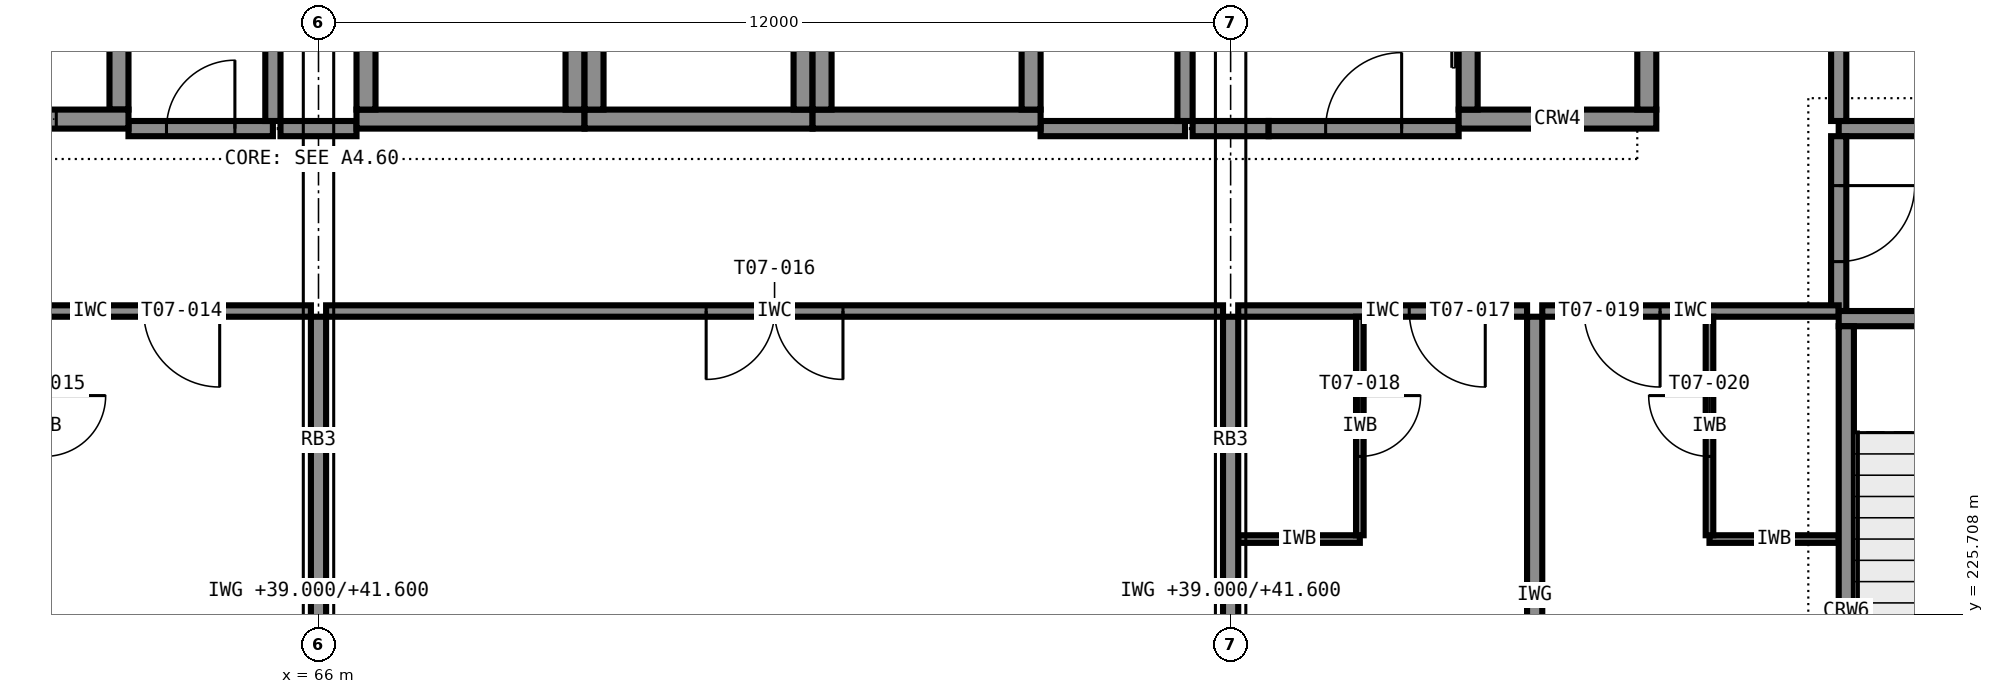
"""IFC4 building model, lengths in metres.
Left out: names, types, materials, properties, quantities, classifications, styles, units other than length and angle.
Written with IfcOpenShell. Run it as: python <this file> out.ifc"""

import sys

from ifc_helpers import new_model, si_unit, direction, frame, frame_2d, origin, place, context, subcontext, project, spatial, rectangle, extrude, element, fill, save


model = new_model("IFC4")
c1 = context("Model", 3, precision=1e-05, world=origin(), true_north=direction((0.0, 1.0)))
c2 = subcontext(c1, "Body", "Model", "MODEL_VIEW")
j1 = project(units=[si_unit("LENGTHUNIT", "METRE"), si_unit("PLANEANGLEUNIT", "RADIAN")], contexts=[c1])
p1 = place(None, origin())
s1 = spatial("IfcSite", under=j1, at=p1, CompositionType="ELEMENT")
p2 = place(p1, origin())
s2 = spatial("IfcBuilding", under=s1, at=p2, CompositionType="ELEMENT")
p3 = place(p2, frame((0.0, 0.0, 39.0)))
s3 = spatial("IfcBuildingStorey", under=s2, at=p3, CompositionType="ELEMENT", Elevation=39.0)
p4 = place(p3, frame((60.5, 232.225, 0.0), z_axis=(0.0, 0.0, 1.0), x_axis=(1.0, 0.0, 0.0)))
e1 = element("IfcWall", 1, at=p4, inside=s3, PredefinedType="SHEAR", context=c2, shape_type="SweptSolid", body=[
    extrude(rectangle(XDim=3.0, YDim=0.25, at=frame_2d((1.5, 0.0))), origin(), (0.0, 0.0, 1.0), 3.6),
])
p5 = place(p4, frame((0.95, 0.0, 0.0)))
e2 = element("IfcOpeningElement", 2, at=p5, cuts=e1, PredefinedType="OPENING", context=c2, shape_type="SweptSolid", body=[
    extrude(rectangle(XDim=1.1, YDim=2.1, at=frame_2d((0.55, 1.05))), frame((0.0, 0.135, 0.0), z_axis=(0.0, -1.0, 0.0), x_axis=(1.0, 0.0, 0.0)), (0.0, 0.0, 1.0), 0.27),
])
p6 = place(p3, frame((63.375, 232.35, 0.0), z_axis=(0.0, 0.0, 1.0), x_axis=(0.0, 1.0, 0.0)))
e3 = element("IfcWall", 3, at=p6, inside=s3, PredefinedType="SHEAR", context=c2, shape_type="SweptSolid", body=[
    extrude(rectangle(XDim=3.3, YDim=0.25, at=frame_2d((1.65, 0.0))), origin(), (0.0, 0.0, 1.0), 3.6),
])
p7 = place(p3, frame((66.5, 232.225, 0.0), z_axis=(0.0, 0.0, 1.0), x_axis=(1.0, 0.0, 0.0)))
e4 = element("IfcWall", 4, at=p7, inside=s3, PredefinedType="SHEAR", context=c2, shape_type="SweptSolid", body=[
    extrude(rectangle(XDim=3.0, YDim=0.25, at=frame_2d((1.5, 0.0))), origin(), (0.0, 0.0, 1.0), 3.6),
])
for number, where, z_axis, x_axis in (
    (5, (66.625, 232.35, 0.0), (0.0, 0.0, 1.0), (0.0, 1.0, 0.0)),
    (6, (69.375, 232.35, 0.0), (0.0, 0.0, 1.0), (0.0, 1.0, 0.0)),
):
    element("IfcWall", number, at=place(p3, frame(where, z_axis=z_axis, x_axis=x_axis)), inside=s3, PredefinedType="SHEAR", context=c2, shape_type="SweptSolid", body=[
        extrude(rectangle(XDim=3.3, YDim=0.25, at=frame_2d((1.65, 0.0))), origin(), (0.0, 0.0, 1.0), 3.6),
    ])
p8 = place(p3, frame((69.5, 232.225, 0.0), z_axis=(0.0, 0.0, 1.0), x_axis=(1.0, 0.0, 0.0)))
e7 = element("IfcWall", 7, at=p8, inside=s3, PredefinedType="SHEAR", context=c2, shape_type="SweptSolid", body=[
    extrude(rectangle(XDim=3.0, YDim=0.25, at=frame_2d((1.5, 0.0))), origin(), (0.0, 0.0, 1.0), 3.6),
])
for number, where, z_axis, x_axis in (
    (8, (69.625, 232.35, 0.0), (0.0, 0.0, 1.0), (0.0, 1.0, 0.0)),
    (9, (72.375, 232.35, 0.0), (0.0, 0.0, 1.0), (0.0, 1.0, 0.0)),
):
    element("IfcWall", number, at=place(p3, frame(where, z_axis=z_axis, x_axis=x_axis)), inside=s3, PredefinedType="SHEAR", context=c2, shape_type="SweptSolid", body=[
        extrude(rectangle(XDim=3.3, YDim=0.25, at=frame_2d((1.65, 0.0))), origin(), (0.0, 0.0, 1.0), 3.6),
    ])
p9 = place(p3, frame((72.5, 232.225, 0.0), z_axis=(0.0, 0.0, 1.0), x_axis=(1.0, 0.0, 0.0)))
e10 = element("IfcWall", 10, at=p9, inside=s3, PredefinedType="SHEAR", context=c2, shape_type="SweptSolid", body=[
    extrude(rectangle(XDim=3.0, YDim=0.25, at=frame_2d((1.5, 0.0))), origin(), (0.0, 0.0, 1.0), 3.6),
])
for number, where, z_axis, x_axis in (
    (11, (72.625, 232.35, 0.0), (0.0, 0.0, 1.0), (0.0, 1.0, 0.0)),
    (12, (75.375, 232.35, 0.0), (0.0, 0.0, 1.0), (0.0, 1.0, 0.0)),
):
    element("IfcWall", number, at=place(p3, frame(where, z_axis=z_axis, x_axis=x_axis)), inside=s3, PredefinedType="SHEAR", context=c2, shape_type="SweptSolid", body=[
        extrude(rectangle(XDim=3.3, YDim=0.25, at=frame_2d((1.65, 0.0))), origin(), (0.0, 0.0, 1.0), 3.6),
    ])
p10 = place(p3, frame((81.0, 232.225, 0.0), z_axis=(0.0, 0.0, 1.0), x_axis=(1.0, 0.0, 0.0)))
e13 = element("IfcWall", 13, at=p10, inside=s3, PredefinedType="SHEAR", context=c2, shape_type="SweptSolid", body=[
    extrude(rectangle(XDim=2.6, YDim=0.25, at=frame_2d((1.3, 0.0))), origin(), (0.0, 0.0, 1.0), 3.6),
])
p11 = place(p3, frame((81.125, 232.35, 0.0), z_axis=(0.0, 0.0, 1.0), x_axis=(0.0, 1.0, 0.0)))
e14 = element("IfcWall", 14, at=p11, inside=s3, PredefinedType="SHEAR", context=c2, shape_type="SweptSolid", body=[
    extrude(rectangle(XDim=3.3, YDim=0.25, at=frame_2d((1.65, 0.0))), origin(), (0.0, 0.0, 1.0), 3.6),
])
p12 = place(p11, frame((1.1, 0.0, 0.0)))
e15 = element("IfcOpeningElement", 15, at=p12, cuts=e14, PredefinedType="OPENING", context=c2, shape_type="SweptSolid", body=[
    extrude(rectangle(XDim=1.1, YDim=2.1, at=frame_2d((0.55, 1.05))), frame((0.0, 0.135, 0.0), z_axis=(0.0, -1.0, 0.0), x_axis=(1.0, 0.0, 0.0)), (0.0, 0.0, 1.0), 0.27),
])
p13 = place(p3, frame((83.475, 232.35, 0.0), z_axis=(0.0, 0.0, 1.0), x_axis=(0.0, 1.0, 0.0)))
e16 = element("IfcWall", 16, at=p13, inside=s3, PredefinedType="SHEAR", context=c2, shape_type="SweptSolid", body=[
    extrude(rectangle(XDim=3.3, YDim=0.25, at=frame_2d((1.65, 0.0))), origin(), (0.0, 0.0, 1.0), 3.6),
])
p14 = place(p3, frame((89.5, 229.6, 0.0), z_axis=(0.0, 0.0, 1.0), x_axis=(-1.0, 0.0, 0.0)))
e17 = element("IfcWall", 17, at=p14, inside=s3, PredefinedType="SHEAR", context=c2, shape_type="SweptSolid", body=[
    extrude(rectangle(XDim=3.5, YDim=0.2, at=frame_2d((1.75, 0.0))), origin(), (0.0, 0.0, 1.0), 3.6),
])
p15 = place(p14, frame((1.15, 0.0, 0.0)))
e18 = element("IfcOpeningElement", 18, at=p15, cuts=e17, PredefinedType="OPENING", context=c2, shape_type="SweptSolid", body=[
    extrude(rectangle(XDim=1.2, YDim=2.1, at=frame_2d((0.6, 1.05))), frame((0.0, 0.11, 0.0), z_axis=(0.0, -1.0, 0.0), x_axis=(1.0, 0.0, 0.0)), (0.0, 0.0, 1.0), 0.22),
])
p16 = place(p3, frame((86.1, 222.0, 0.0), z_axis=(0.0, 0.0, 1.0), x_axis=(0.0, 1.0, 0.0)))
e19 = element("IfcWall", 19, at=p16, inside=s3, PredefinedType="SHEAR", context=c2, shape_type="SweptSolid", body=[
    extrude(rectangle(XDim=7.5, YDim=0.2, at=frame_2d((3.75, 0.0))), origin(), (0.0, 0.0, 1.0), 3.6),
])
p17 = place(p3, frame((63.5, 232.1, 0.0), z_axis=(0.0, 0.0, 1.0), x_axis=(1.0, 0.0, 0.0)))
e20 = element("IfcWall", 20, at=p17, inside=s3, PredefinedType="PARTITIONING", context=c2, shape_type="SweptSolid", body=[
    extrude(rectangle(XDim=1.9, YDim=0.2, at=frame_2d((0.95, 0.0))), origin(), (0.0, 0.0, 1.0), 3.4),
])
p18 = place(p17, frame((0.5, 0.0, 0.0)))
e21 = element("IfcOpeningElement", 21, at=p18, cuts=e20, PredefinedType="OPENING", context=c2, shape_type="SweptSolid", body=[
    extrude(rectangle(XDim=0.9, YDim=2.1, at=frame_2d((0.45, 1.05))), frame((0.0, 0.11, 0.0), z_axis=(0.0, -1.0, 0.0), x_axis=(1.0, 0.0, 0.0)), (0.0, 0.0, 1.0), 0.22),
])
p19 = place(p3, frame((65.5, 232.1, 0.0), z_axis=(0.0, 0.0, 1.0), x_axis=(1.0, 0.0, 0.0)))
e22 = element("IfcWall", 22, at=p19, inside=s3, PredefinedType="PARTITIONING", context=c2, shape_type="SweptSolid", body=[
    extrude(rectangle(XDim=1.0, YDim=0.2, at=frame_2d((0.5, 0.0))), origin(), (0.0, 0.0, 1.0), 3.4),
])
p20 = place(p3, frame((75.5, 232.1, 0.0), z_axis=(0.0, 0.0, 1.0), x_axis=(1.0, 0.0, 0.0)))
e23 = element("IfcWall", 23, at=p20, inside=s3, PredefinedType="PARTITIONING", context=c2, shape_type="SweptSolid", body=[
    extrude(rectangle(XDim=1.9, YDim=0.2, at=frame_2d((0.95, 0.0))), origin(), (0.0, 0.0, 1.0), 3.4),
])
p21 = place(p3, frame((77.5, 232.1, 0.0), z_axis=(0.0, 0.0, 1.0), x_axis=(1.0, 0.0, 0.0)))
e24 = element("IfcWall", 24, at=p21, inside=s3, PredefinedType="PARTITIONING", context=c2, shape_type="SweptSolid", body=[
    extrude(rectangle(XDim=1.0, YDim=0.2, at=frame_2d((0.5, 0.0))), origin(), (0.0, 0.0, 1.0), 3.4),
])
p22 = place(p3, frame((78.5, 232.1, 0.0), z_axis=(0.0, 0.0, 1.0), x_axis=(1.0, 0.0, 0.0)))
e25 = element("IfcWall", 25, at=p22, inside=s3, PredefinedType="PARTITIONING", context=c2, shape_type="SweptSolid", body=[
    extrude(rectangle(XDim=2.5, YDim=0.2, at=frame_2d((1.25, 0.0))), origin(), (0.0, 0.0, 1.0), 3.4),
])
p23 = place(p22, frame((0.75, 0.0, 0.0)))
e26 = element("IfcOpeningElement", 26, at=p23, cuts=e25, PredefinedType="OPENING", context=c2, shape_type="SweptSolid", body=[
    extrude(rectangle(XDim=1.0, YDim=2.1, at=frame_2d((0.5, 1.05))), frame((0.0, 0.11, 0.0), z_axis=(0.0, -1.0, 0.0), x_axis=(1.0, 0.0, 0.0)), (0.0, 0.0, 1.0), 0.22),
])
p24 = place(p3, frame((86.0, 232.1, 0.0), z_axis=(0.0, 0.0, 1.0), x_axis=(1.0, 0.0, 0.0)))
e27 = element("IfcWall", 27, at=p24, inside=s3, PredefinedType="PARTITIONING", context=c2, shape_type="SweptSolid", body=[
    extrude(rectangle(XDim=3.7, YDim=0.2, at=frame_2d((1.85, 0.0))), origin(), (0.0, 0.0, 1.0), 3.4),
])
for number, where, z_axis, x_axis in (
    (28, (65.4, 232.2, 0.0), (0.0, 0.0, 1.0), (0.0, 1.0, 0.0)),
    (29, (77.4, 232.2, 0.0), (0.0, 0.0, 1.0), (0.0, 1.0, 0.0)),
):
    element("IfcWall", number, at=place(p3, frame(where, z_axis=z_axis, x_axis=x_axis)), inside=s3, PredefinedType="PARTITIONING", context=c2, shape_type="SweptSolid", body=[
        extrude(rectangle(XDim=3.6, YDim=0.2, at=frame_2d((1.8, 0.0))), origin(), (0.0, 0.0, 1.0), 3.4),
    ])
p25 = place(p3, frame((86.0, 235.8, 0.0), z_axis=(0.0, 0.0, 1.0), x_axis=(0.0, -1.0, 0.0)))
e30 = element("IfcWall", 30, at=p25, inside=s3, PredefinedType="PARTITIONING", context=c2, shape_type="SweptSolid", body=[
    extrude(rectangle(XDim=3.6, YDim=0.2, at=frame_2d((1.8, 0.0))), origin(), (0.0, 0.0, 1.0), 3.4),
])
p26 = place(p25, frame((1.35, 0.0, 0.0)))
e31 = element("IfcOpeningElement", 31, at=p26, cuts=e30, PredefinedType="OPENING", context=c2, shape_type="SweptSolid", body=[
    extrude(rectangle(XDim=0.9, YDim=2.1, at=frame_2d((0.45, 1.05))), frame((0.0, 0.11, 0.0), z_axis=(0.0, -1.0, 0.0), x_axis=(1.0, 0.0, 0.0)), (0.0, 0.0, 1.0), 0.22),
])
p27 = place(p3, frame((86.0, 232.0, 0.0), z_axis=(0.0, 0.0, 1.0), x_axis=(0.0, -1.0, 0.0)))
e32 = element("IfcWall", 32, at=p27, inside=s3, PredefinedType="PARTITIONING", context=c2, shape_type="SweptSolid", body=[
    extrude(rectangle(XDim=2.3, YDim=0.2, at=frame_2d((1.15, 0.0))), origin(), (0.0, 0.0, 1.0), 3.4),
])
p28 = place(p27, frame((0.65, 0.0, 0.0)))
e33 = element("IfcOpeningElement", 33, at=p28, cuts=e32, PredefinedType="OPENING", context=c2, shape_type="SweptSolid", body=[
    extrude(rectangle(XDim=1.0, YDim=2.1, at=frame_2d((0.5, 1.05))), frame((0.0, 0.11, 0.0), z_axis=(0.0, -1.0, 0.0), x_axis=(1.0, 0.0, 0.0)), (0.0, 0.0, 1.0), 0.22),
])
p29 = place(p3, frame((65.9, 229.7, 0.0), z_axis=(0.0, 0.0, 1.0), x_axis=(-1.0, 0.0, 0.0)))
e34 = element("IfcWall", 34, at=p29, inside=s3, PredefinedType="PARTITIONING", context=c2, shape_type="SweptSolid", body=[
    extrude(rectangle(XDim=5.8, YDim=0.15, at=frame_2d((2.9, 0.0))), origin(), (0.0, 0.0, 1.0), 3.4),
])
p30 = place(p29, frame((1.2, 0.0, 0.0)))
e35 = element("IfcOpeningElement", 35, at=p30, cuts=e34, PredefinedType="OPENING", context=c2, shape_type="SweptSolid", body=[
    extrude(rectangle(XDim=1.0, YDim=2.1, at=frame_2d((0.5, 1.05))), frame((0.0, 0.085, 0.0), z_axis=(0.0, -1.0, 0.0), x_axis=(1.0, 0.0, 0.0)), (0.0, 0.0, 1.0), 0.17),
])
p31 = place(p3, frame((77.9, 229.7, 0.0), z_axis=(0.0, 0.0, 1.0), x_axis=(-1.0, 0.0, 0.0)))
e36 = element("IfcWall", 36, at=p31, inside=s3, PredefinedType="PARTITIONING", context=c2, shape_type="SweptSolid", body=[
    extrude(rectangle(XDim=11.8, YDim=0.15, at=frame_2d((5.9, 0.0))), origin(), (0.0, 0.0, 1.0), 3.4),
])
p32 = place(p31, frame((5.0, 0.0, 0.0)))
e37 = element("IfcOpeningElement", 37, at=p32, cuts=e36, PredefinedType="OPENING", context=c2, shape_type="SweptSolid", body=[
    extrude(rectangle(XDim=1.8, YDim=2.1, at=frame_2d((0.9, 1.05))), frame((0.0, 0.085, 0.0), z_axis=(0.0, -1.0, 0.0), x_axis=(1.0, 0.0, 0.0)), (0.0, 0.0, 1.0), 0.17),
])
p33 = place(p3, frame((81.9, 229.7, 0.0), z_axis=(0.0, 0.0, 1.0), x_axis=(-1.0, 0.0, 0.0)))
e38 = element("IfcWall", 38, at=p33, inside=s3, PredefinedType="PARTITIONING", context=c2, shape_type="SweptSolid", body=[
    extrude(rectangle(XDim=3.8, YDim=0.15, at=frame_2d((1.9, 0.0))), origin(), (0.0, 0.0, 1.0), 3.4),
])
p34 = place(p33, frame((0.55, 0.0, 0.0)))
e39 = element("IfcOpeningElement", 39, at=p34, cuts=e38, PredefinedType="OPENING", context=c2, shape_type="SweptSolid", body=[
    extrude(rectangle(XDim=1.0, YDim=2.1, at=frame_2d((0.5, 1.05))), frame((0.0, 0.085, 0.0), z_axis=(0.0, -1.0, 0.0), x_axis=(1.0, 0.0, 0.0)), (0.0, 0.0, 1.0), 0.17),
])
p35 = place(p3, frame((78.1, 226.7, 0.0), z_axis=(0.0, 0.0, 1.0), x_axis=(1.0, 0.0, 0.0)))
e40 = element("IfcWall", 40, at=p35, inside=s3, PredefinedType="PARTITIONING", context=c2, shape_type="SweptSolid", body=[
    extrude(rectangle(XDim=1.6, YDim=0.1, at=frame_2d((0.8, 0.0))), origin(), (0.0, 0.0, 1.0), 3.4),
])
p36 = place(p3, frame((79.7, 229.625, 0.0), z_axis=(0.0, 0.0, 1.0), x_axis=(0.0, -1.0, 0.0)))
e41 = element("IfcWall", 41, at=p36, inside=s3, PredefinedType="PARTITIONING", context=c2, shape_type="SweptSolid", body=[
    extrude(rectangle(XDim=2.875, YDim=0.1, at=frame_2d((1.438, 0.0))), origin(), (0.0, 0.0, 1.0), 3.4),
])
p37 = place(p36, frame((1.038, 0.0, 0.0)))
e42 = element("IfcOpeningElement", 42, at=p37, cuts=e41, PredefinedType="OPENING", context=c2, shape_type="SweptSolid", body=[
    extrude(rectangle(XDim=0.8, YDim=2.1, at=frame_2d((0.4, 1.05))), frame((0.0, 0.06, 0.0), z_axis=(0.0, -1.0, 0.0), x_axis=(1.0, 0.0, 0.0)), (0.0, 0.0, 1.0), 0.12),
])
p38 = place(p3, frame((86.0, 229.7, 0.0), z_axis=(0.0, 0.0, 1.0), x_axis=(-1.0, 0.0, 0.0)))
e43 = element("IfcWall", 43, at=p38, inside=s3, PredefinedType="PARTITIONING", context=c2, shape_type="SweptSolid", body=[
    extrude(rectangle(XDim=3.9, YDim=0.15, at=frame_2d((1.95, 0.0))), origin(), (0.0, 0.0, 1.0), 3.4),
])
p39 = place(p38, frame((2.35, 0.0, 0.0)))
e44 = element("IfcOpeningElement", 44, at=p39, cuts=e43, PredefinedType="OPENING", context=c2, shape_type="SweptSolid", body=[
    extrude(rectangle(XDim=1.0, YDim=2.1, at=frame_2d((0.5, 1.05))), frame((0.0, 0.085, 0.0), z_axis=(0.0, -1.0, 0.0), x_axis=(1.0, 0.0, 0.0)), (0.0, 0.0, 1.0), 0.17),
])
p40 = place(p3, frame((84.3, 226.7, 0.0), z_axis=(0.0, 0.0, 1.0), x_axis=(1.0, 0.0, 0.0)))
e45 = element("IfcWall", 45, at=p40, inside=s3, PredefinedType="PARTITIONING", context=c2, shape_type="SweptSolid", body=[
    extrude(rectangle(XDim=1.7, YDim=0.1, at=frame_2d((0.85, 0.0))), origin(), (0.0, 0.0, 1.0), 3.4),
])
p41 = place(p3, frame((84.3, 226.75, 0.0), z_axis=(0.0, 0.0, 1.0), x_axis=(0.0, 1.0, 0.0)))
e46 = element("IfcWall", 46, at=p41, inside=s3, PredefinedType="PARTITIONING", context=c2, shape_type="SweptSolid", body=[
    extrude(rectangle(XDim=2.875, YDim=0.1, at=frame_2d((1.438, 0.0))), origin(), (0.0, 0.0, 1.0), 3.4),
])
p42 = place(p41, frame((1.038, 0.0, 0.0)))
e47 = element("IfcOpeningElement", 47, at=p42, cuts=e46, PredefinedType="OPENING", context=c2, shape_type="SweptSolid", body=[
    extrude(rectangle(XDim=0.8, YDim=2.1, at=frame_2d((0.4, 1.05))), frame((0.0, 0.06, 0.0), z_axis=(0.0, -1.0, 0.0), x_axis=(1.0, 0.0, 0.0)), (0.0, 0.0, 1.0), 0.12),
])
for number, where, z_axis, x_axis in (
    (48, (66.0, 222.4, 0.0), (0.0, 0.0, 1.0), (0.0, 1.0, 0.0)),
    (49, (78.0, 222.4, 0.0), (0.0, 0.0, 1.0), (0.0, 1.0, 0.0)),
):
    element("IfcWall", number, at=place(p3, frame(where, z_axis=z_axis, x_axis=x_axis)), inside=s3, PredefinedType="PARTITIONING", context=c2, shape_type="SweptSolid", body=[
        extrude(rectangle(XDim=7.225, YDim=0.2, at=frame_2d((3.613, 0.0))), origin(), (0.0, 0.0, 1.0), 2.6),
    ])
p43 = place(p3, frame((82.0, 222.3, 0.0), z_axis=(0.0, 0.0, 1.0), x_axis=(0.0, 1.0, 0.0)))
e50 = element("IfcWall", 50, at=p43, inside=s3, PredefinedType="PARTITIONING", context=c2, shape_type="SweptSolid", body=[
    extrude(rectangle(XDim=7.325, YDim=0.2, at=frame_2d((3.663, 0.0))), origin(), (0.0, 0.0, 1.0), 3.4),
])
p44 = place(p18, origin())
e51 = element("IfcDoor", 51, at=p44, inside=s3, OperationType="SINGLE_SWING_RIGHT", PredefinedType="DOOR", context=c2, shape_type="SweptSolid", body=[
    extrude(rectangle(XDim=0.9, YDim=2.1, at=frame_2d((0.45, 1.05))), frame((0.0, 0.025, 0.0), z_axis=(0.0, -1.0, 0.0), x_axis=(1.0, 0.0, 0.0)), (0.0, 0.0, 1.0), 0.05),
])
fill(e21, e51)
p45 = place(p23, origin())
e52 = element("IfcDoor", 52, at=p45, inside=s3, OperationType="SINGLE_SWING_RIGHT", PredefinedType="DOOR", context=c2, shape_type="SweptSolid", body=[
    extrude(rectangle(XDim=1.0, YDim=2.1, at=frame_2d((0.5, 1.05))), frame((0.0, 0.025, 0.0), z_axis=(0.0, -1.0, 0.0), x_axis=(1.0, 0.0, 0.0)), (0.0, 0.0, 1.0), 0.05),
])
fill(e26, e52)
p46 = place(p28, origin())
e53 = element("IfcDoor", 53, at=p46, inside=s3, OperationType="SINGLE_SWING_LEFT", PredefinedType="DOOR", context=c2, shape_type="SweptSolid", body=[
    extrude(rectangle(XDim=1.0, YDim=2.1, at=frame_2d((0.5, 1.05))), frame((0.0, 0.025, 0.0), z_axis=(0.0, -1.0, 0.0), x_axis=(1.0, 0.0, 0.0)), (0.0, 0.0, 1.0), 0.05),
])
fill(e33, e53)
p47 = place(p30, origin())
e54 = element("IfcDoor", 54, at=p47, inside=s3, OperationType="SINGLE_SWING_LEFT", PredefinedType="DOOR", context=c2, shape_type="SweptSolid", body=[
    extrude(rectangle(XDim=1.0, YDim=2.1, at=frame_2d((0.5, 1.05))), frame((0.0, 0.025, 0.0), z_axis=(0.0, -1.0, 0.0), x_axis=(1.0, 0.0, 0.0)), (0.0, 0.0, 1.0), 0.05),
])
fill(e35, e54)
p48 = place(p32, origin())
e55 = element("IfcDoor", 55, at=p48, inside=s3, OperationType="DOUBLE_DOOR_SINGLE_SWING", PredefinedType="DOOR", context=c2, shape_type="SweptSolid", body=[
    extrude(rectangle(XDim=1.8, YDim=2.1, at=frame_2d((0.9, 1.05))), frame((0.0, 0.025, 0.0), z_axis=(0.0, -1.0, 0.0), x_axis=(1.0, 0.0, 0.0)), (0.0, 0.0, 1.0), 0.05),
])
fill(e37, e55)
p49 = place(p34, origin())
e56 = element("IfcDoor", 56, at=p49, inside=s3, OperationType="SINGLE_SWING_LEFT", PredefinedType="DOOR", context=c2, shape_type="SweptSolid", body=[
    extrude(rectangle(XDim=1.0, YDim=2.1, at=frame_2d((0.5, 1.05))), frame((0.0, 0.025, 0.0), z_axis=(0.0, -1.0, 0.0), x_axis=(1.0, 0.0, 0.0)), (0.0, 0.0, 1.0), 0.05),
])
fill(e39, e56)
p50 = place(p37, origin())
e57 = element("IfcDoor", 57, at=p50, inside=s3, OperationType="SINGLE_SWING_LEFT", PredefinedType="DOOR", context=c2, shape_type="SweptSolid", body=[
    extrude(rectangle(XDim=0.8, YDim=2.1, at=frame_2d((0.4, 1.05))), frame((0.0, 0.025, 0.0), z_axis=(0.0, -1.0, 0.0), x_axis=(1.0, 0.0, 0.0)), (0.0, 0.0, 1.0), 0.05),
])
fill(e42, e57)
p51 = place(p39, origin())
e58 = element("IfcDoor", 58, at=p51, inside=s3, OperationType="SINGLE_SWING_LEFT", PredefinedType="DOOR", context=c2, shape_type="SweptSolid", body=[
    extrude(rectangle(XDim=1.0, YDim=2.1, at=frame_2d((0.5, 1.05))), frame((0.0, 0.025, 0.0), z_axis=(0.0, -1.0, 0.0), x_axis=(1.0, 0.0, 0.0)), (0.0, 0.0, 1.0), 0.05),
])
fill(e44, e58)
p52 = place(p42, origin())
e59 = element("IfcDoor", 59, at=p52, inside=s3, OperationType="SINGLE_SWING_RIGHT", PredefinedType="DOOR", context=c2, shape_type="SweptSolid", body=[
    extrude(rectangle(XDim=0.8, YDim=2.1, at=frame_2d((0.4, 1.05))), frame((0.0, 0.025, 0.0), z_axis=(0.0, -1.0, 0.0), x_axis=(1.0, 0.0, 0.0)), (0.0, 0.0, 1.0), 0.05),
])
fill(e47, e59)
p53 = place(p5, origin())
e60 = element("IfcDoor", 60, at=p53, inside=s3, OperationType="SLIDING_TO_LEFT", PredefinedType="DOOR", context=c2, shape_type="SweptSolid", body=[
    extrude(rectangle(XDim=1.1, YDim=2.1, at=frame_2d((0.55, 1.05))), frame((0.0, 0.025, 0.0), z_axis=(0.0, -1.0, 0.0), x_axis=(1.0, 0.0, 0.0)), (0.0, 0.0, 1.0), 0.05),
])
fill(e2, e60)
save(model, sys.argv[1])
